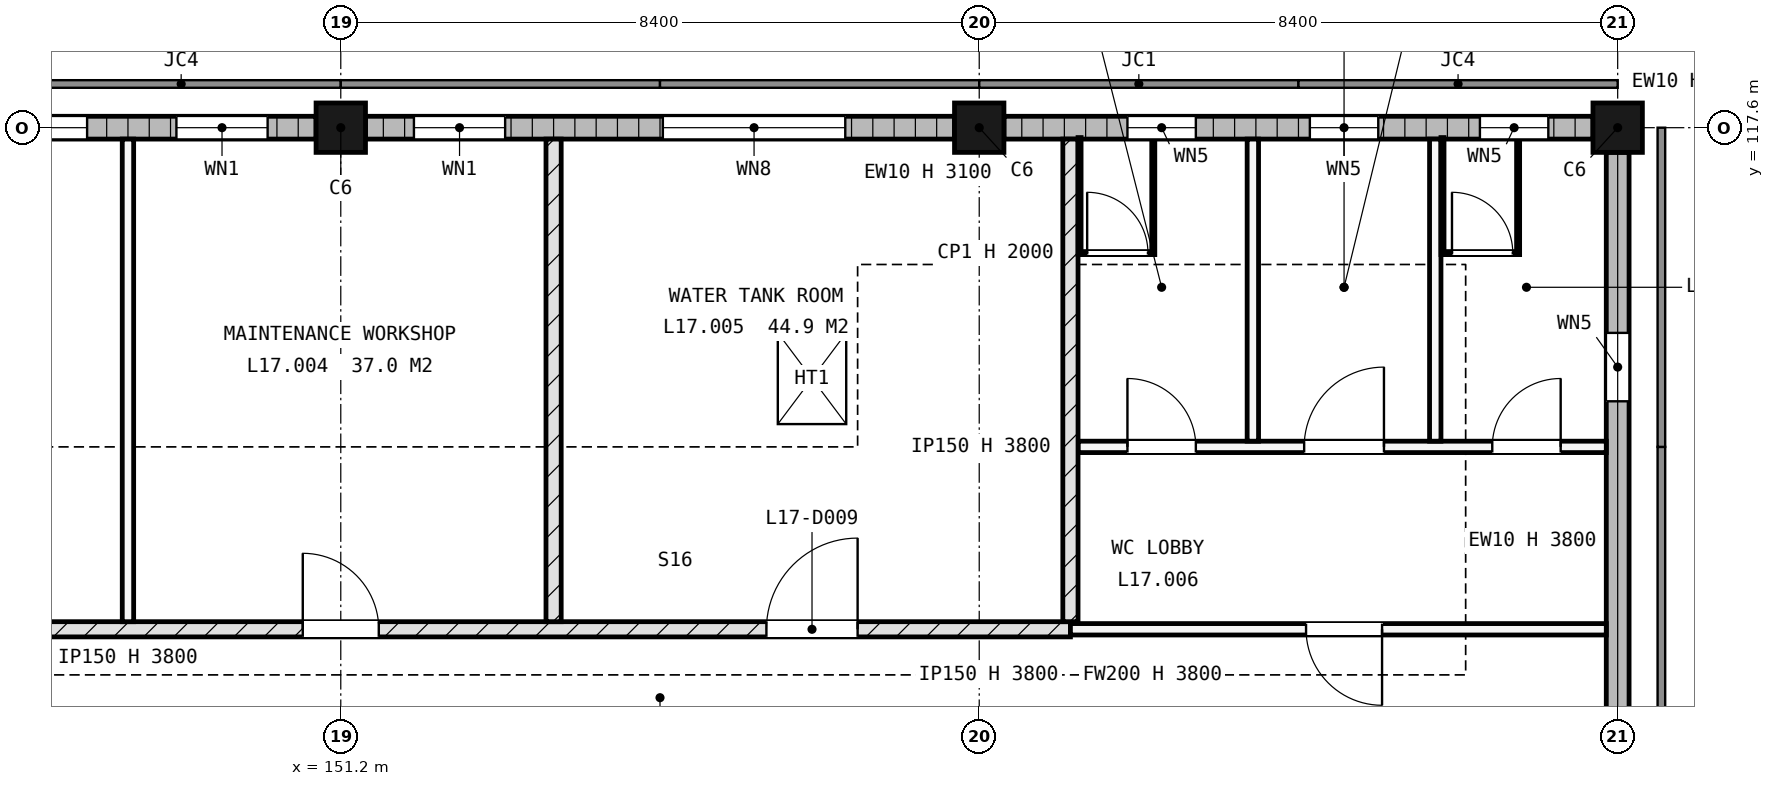
"""IFC4 building model, lengths in metres.
Left out: names, types, materials, properties, quantities, classifications, styles, units other than length and angle.
Written with IfcOpenShell. Run it as: python <this file> out.ifc"""

import sys

from ifc_helpers import new_model, si_unit, direction, frame, frame_2d, origin, origin_2d, place, context, subcontext, project, spatial, rectangle, extrude, element, fill, save


model = new_model("IFC4")
c1 = context("Model", 3, precision=1e-05, world=origin(), true_north=direction((0.0, 1.0)))
c2 = subcontext(c1, "Body", "Model", "MODEL_VIEW")
j1 = project(units=[si_unit("LENGTHUNIT", "METRE"), si_unit("PLANEANGLEUNIT", "RADIAN")], contexts=[c1])
p1 = place(None, origin())
s1 = spatial("IfcSite", under=j1, at=p1, CompositionType="ELEMENT")
p2 = place(p1, origin())
s2 = spatial("IfcBuilding", under=s1, at=p2, CompositionType="ELEMENT")
p3 = place(p2, frame((0.0, 0.0, 64.8)))
s3 = spatial("IfcBuildingStorey", under=s2, at=p3, CompositionType="ELEMENT", Elevation=64.8)
for number, where, z_axis, x_axis in (
    (1, (151.2, 117.6, -0.3), (0.0, 0.0, 1.0), (1.0, 0.0, 0.0)),
    (2, (159.6, 117.6, -0.3), (0.0, 0.0, 1.0), (1.0, 0.0, 0.0)),
    (3, (168.0, 117.6, -0.3), (0.0, 0.0, 1.0), (1.0, 0.0, 0.0)),
):
    element("IfcColumn", number, at=place(p3, frame(where, z_axis=z_axis, x_axis=x_axis)), inside=s3, PredefinedType="COLUMN", context=c2, shape_type="SweptSolid", body=[
        extrude(rectangle(XDim=0.65, YDim=0.65, at=origin_2d()), origin(), (0.0, 0.0, 1.0), 4.4),
    ])
p4 = place(p3, frame((143.125, 117.6, 0.0), z_axis=(0.0, 0.0, 1.0), x_axis=(1.0, 0.0, 0.0)))
e4 = element("IfcWall", 4, at=p4, inside=s3, PredefinedType="STANDARD", context=c2, shape_type="SweptSolid", body=[
    extrude(rectangle(XDim=7.75, YDim=0.3, at=frame_2d((3.875, 0.0))), origin(), (0.0, 0.0, 1.0), 3.1),
])
p5 = place(p4, frame((0.538, 0.0, 0.9)))
e5 = element("IfcOpeningElement", 5, at=p5, cuts=e4, PredefinedType="OPENING", context=c2, shape_type="SweptSolid", body=[
    extrude(rectangle(XDim=4.2, YDim=1.5, at=frame_2d((2.1, 0.75))), frame((0.0, 0.16, 0.0), z_axis=(0.0, -1.0, 0.0), x_axis=(1.0, 0.0, 0.0)), (0.0, 0.0, 1.0), 0.32),
])
p6 = place(p4, frame((5.913, 0.0, 0.9)))
e6 = element("IfcOpeningElement", 6, at=p6, cuts=e4, PredefinedType="OPENING", context=c2, shape_type="SweptSolid", body=[
    extrude(rectangle(XDim=1.2, YDim=1.5, at=frame_2d((0.6, 0.75))), frame((0.0, 0.16, 0.0), z_axis=(0.0, -1.0, 0.0), x_axis=(1.0, 0.0, 0.0)), (0.0, 0.0, 1.0), 0.32),
])
p7 = place(p3, frame((151.525, 117.6, 0.0), z_axis=(0.0, 0.0, 1.0), x_axis=(1.0, 0.0, 0.0)))
e7 = element("IfcWall", 7, at=p7, inside=s3, PredefinedType="STANDARD", context=c2, shape_type="SweptSolid", body=[
    extrude(rectangle(XDim=7.75, YDim=0.3, at=frame_2d((3.875, 0.0))), origin(), (0.0, 0.0, 1.0), 3.1),
])
p8 = place(p7, frame((0.637, 0.0, 0.9)))
e8 = element("IfcOpeningElement", 8, at=p8, cuts=e7, PredefinedType="OPENING", context=c2, shape_type="SweptSolid", body=[
    extrude(rectangle(XDim=1.2, YDim=1.5, at=frame_2d((0.6, 0.75))), frame((0.0, 0.16, 0.0), z_axis=(0.0, -1.0, 0.0), x_axis=(1.0, 0.0, 0.0)), (0.0, 0.0, 1.0), 0.32),
])
p9 = place(p7, frame((3.913, 0.0, 0.55)))
e9 = element("IfcOpeningElement", 9, at=p9, cuts=e7, PredefinedType="OPENING", context=c2, shape_type="SweptSolid", body=[
    extrude(rectangle(XDim=2.4, YDim=2.4, at=frame_2d((1.2, 1.2))), frame((0.0, 0.16, 0.0), z_axis=(0.0, -1.0, 0.0), x_axis=(1.0, 0.0, 0.0)), (0.0, 0.0, 1.0), 0.32),
])
p10 = place(p3, frame((159.925, 117.6, 0.0), z_axis=(0.0, 0.0, 1.0), x_axis=(1.0, 0.0, 0.0)))
e10 = element("IfcWall", 10, at=p10, inside=s3, PredefinedType="STANDARD", context=c2, shape_type="SweptSolid", body=[
    extrude(rectangle(XDim=7.75, YDim=0.3, at=frame_2d((3.875, 0.0))), origin(), (0.0, 0.0, 1.0), 3.1),
])
p11 = place(p10, frame((1.625, 0.0, 2.1)))
e11 = element("IfcOpeningElement", 11, at=p11, cuts=e10, PredefinedType="OPENING", context=c2, shape_type="SweptSolid", body=[
    extrude(rectangle(XDim=0.9, YDim=0.6, at=frame_2d((0.45, 0.3))), frame((0.0, 0.16, 0.0), z_axis=(0.0, -1.0, 0.0), x_axis=(1.0, 0.0, 0.0)), (0.0, 0.0, 1.0), 0.32),
])
p12 = place(p10, frame((4.025, 0.0, 2.1)))
e12 = element("IfcOpeningElement", 12, at=p12, cuts=e10, PredefinedType="OPENING", context=c2, shape_type="SweptSolid", body=[
    extrude(rectangle(XDim=0.9, YDim=0.6, at=frame_2d((0.45, 0.3))), frame((0.0, 0.16, 0.0), z_axis=(0.0, -1.0, 0.0), x_axis=(1.0, 0.0, 0.0)), (0.0, 0.0, 1.0), 0.32),
])
p13 = place(p10, frame((6.262, 0.0, 2.1)))
e13 = element("IfcOpeningElement", 13, at=p13, cuts=e10, PredefinedType="OPENING", context=c2, shape_type="SweptSolid", body=[
    extrude(rectangle(XDim=0.9, YDim=0.6, at=frame_2d((0.45, 0.3))), frame((0.0, 0.16, 0.0), z_axis=(0.0, -1.0, 0.0), x_axis=(1.0, 0.0, 0.0)), (0.0, 0.0, 1.0), 0.32),
])
p14 = place(p3, frame((168.0, 109.4, 0.0), z_axis=(0.0, 0.0, 1.0), x_axis=(0.0, 1.0, 0.0)))
e14 = element("IfcWall", 14, at=p14, inside=s3, PredefinedType="STANDARD", context=c2, shape_type="SweptSolid", body=[
    extrude(rectangle(XDim=7.875, YDim=0.3, at=frame_2d((3.938, 0.0))), origin(), (0.0, 0.0, 1.0), 3.8),
])
p15 = place(p14, frame((4.6, 0.0, 2.1)))
e15 = element("IfcOpeningElement", 15, at=p15, cuts=e14, PredefinedType="OPENING", context=c2, shape_type="SweptSolid", body=[
    extrude(rectangle(XDim=0.9, YDim=0.6, at=frame_2d((0.45, 0.3))), frame((0.0, 0.16, 0.0), z_axis=(0.0, -1.0, 0.0), x_axis=(1.0, 0.0, 0.0)), (0.0, 0.0, 1.0), 0.32),
])
p16 = place(p3, frame((142.95, 111.0, 0.0), z_axis=(0.0, 0.0, 1.0), x_axis=(1.0, 0.0, 0.0)))
e16 = element("IfcWall", 16, at=p16, inside=s3, PredefinedType="SOLIDWALL", context=c2, shape_type="SweptSolid", body=[
    extrude(rectangle(XDim=17.85, YDim=0.2, at=frame_2d((8.925, 0.0))), origin(), (0.0, 0.0, 1.0), 3.8),
])
p17 = place(p16, frame((2.15, 0.0, 0.0)))
e17 = element("IfcOpeningElement", 17, at=p17, cuts=e16, PredefinedType="OPENING", context=c2, shape_type="SweptSolid", body=[
    extrude(rectangle(XDim=1.0, YDim=2.1, at=frame_2d((0.5, 1.05))), frame((0.0, 0.11, 0.0), z_axis=(0.0, -1.0, 0.0), x_axis=(1.0, 0.0, 0.0)), (0.0, 0.0, 1.0), 0.22),
])
p18 = place(p16, frame((7.75, 0.0, 0.0)))
e18 = element("IfcOpeningElement", 18, at=p18, cuts=e16, PredefinedType="OPENING", context=c2, shape_type="SweptSolid", body=[
    extrude(rectangle(XDim=1.0, YDim=2.1, at=frame_2d((0.5, 1.05))), frame((0.0, 0.11, 0.0), z_axis=(0.0, -1.0, 0.0), x_axis=(1.0, 0.0, 0.0)), (0.0, 0.0, 1.0), 0.22),
])
p19 = place(p16, frame((13.85, 0.0, 0.0)))
e19 = element("IfcOpeningElement", 19, at=p19, cuts=e16, PredefinedType="OPENING", context=c2, shape_type="SweptSolid", body=[
    extrude(rectangle(XDim=1.2, YDim=2.4, at=frame_2d((0.6, 1.2))), frame((0.0, 0.11, 0.0), z_axis=(0.0, -1.0, 0.0), x_axis=(1.0, 0.0, 0.0)), (0.0, 0.0, 1.0), 0.22),
])
p20 = place(p3, frame((160.8, 111.0, 0.0), z_axis=(0.0, 0.0, 1.0), x_axis=(1.0, 0.0, 0.0)))
e20 = element("IfcWall", 20, at=p20, inside=s3, PredefinedType="PARTITIONING", context=c2, shape_type="SweptSolid", body=[
    extrude(rectangle(XDim=7.05, YDim=0.15, at=frame_2d((3.525, 0.0))), origin(), (0.0, 0.0, 1.0), 3.8),
])
p21 = place(p20, frame((3.1, 0.0, 0.0)))
e21 = element("IfcOpeningElement", 21, at=p21, cuts=e20, PredefinedType="OPENING", context=c2, shape_type="SweptSolid", body=[
    extrude(rectangle(XDim=1.0, YDim=2.1, at=frame_2d((0.5, 1.05))), frame((0.0, 0.085, 0.0), z_axis=(0.0, -1.0, 0.0), x_axis=(1.0, 0.0, 0.0)), (0.0, 0.0, 1.0), 0.17),
])
p22 = place(p3, frame((160.9, 113.4, 0.0), z_axis=(0.0, 0.0, 1.0), x_axis=(1.0, 0.0, 0.0)))
e22 = element("IfcWall", 22, at=p22, inside=s3, PredefinedType="PARTITIONING", context=c2, shape_type="SweptSolid", body=[
    extrude(rectangle(XDim=6.95, YDim=0.15, at=frame_2d((3.475, 0.0))), origin(), (0.0, 0.0, 1.0), 3.8),
])
p23 = place(p22, frame((0.65, 0.0, 0.0)))
e23 = element("IfcOpeningElement", 23, at=p23, cuts=e22, PredefinedType="OPENING", context=c2, shape_type="SweptSolid", body=[
    extrude(rectangle(XDim=0.9, YDim=2.1, at=frame_2d((0.45, 1.05))), frame((0.0, 0.085, 0.0), z_axis=(0.0, -1.0, 0.0), x_axis=(1.0, 0.0, 0.0)), (0.0, 0.0, 1.0), 0.17),
])
p24 = place(p22, frame((2.975, 0.0, 0.0)))
e24 = element("IfcOpeningElement", 24, at=p24, cuts=e22, PredefinedType="OPENING", context=c2, shape_type="SweptSolid", body=[
    extrude(rectangle(XDim=1.05, YDim=2.25, at=frame_2d((0.525, 1.125))), frame((0.0, 0.085, 0.0), z_axis=(0.0, -1.0, 0.0), x_axis=(1.0, 0.0, 0.0)), (0.0, 0.0, 1.0), 0.17),
])
p25 = place(p22, frame((5.45, 0.0, 0.0)))
e25 = element("IfcOpeningElement", 25, at=p25, cuts=e22, PredefinedType="OPENING", context=c2, shape_type="SweptSolid", body=[
    extrude(rectangle(XDim=0.9, YDim=2.1, at=frame_2d((0.45, 1.05))), frame((0.0, 0.085, 0.0), z_axis=(0.0, -1.0, 0.0), x_axis=(1.0, 0.0, 0.0)), (0.0, 0.0, 1.0), 0.17),
])
p26 = place(p3, frame((148.4, 111.1, 0.0), z_axis=(0.0, 0.0, 1.0), x_axis=(0.0, 1.0, 0.0)))
e26 = element("IfcWall", 26, at=p26, inside=s3, PredefinedType="PARTITIONING", context=c2, shape_type="SweptSolid", body=[
    extrude(rectangle(XDim=6.35, YDim=0.15, at=frame_2d((3.175, 0.0))), origin(), (0.0, 0.0, 1.0), 3.8),
])
for number, where, z_axis, x_axis in (
    (27, (154.0, 111.1, 0.0), (0.0, 0.0, 1.0), (0.0, 1.0, 0.0)),
    (28, (160.8, 111.1, 0.0), (0.0, 0.0, 1.0), (0.0, 1.0, 0.0)),
):
    element("IfcWall", number, at=place(p3, frame(where, z_axis=z_axis, x_axis=x_axis)), inside=s3, PredefinedType="SOLIDWALL", context=c2, shape_type="SweptSolid", body=[
        extrude(rectangle(XDim=6.35, YDim=0.2, at=frame_2d((3.175, 0.0))), origin(), (0.0, 0.0, 1.0), 3.8),
    ])
for number, where, z_axis, x_axis in (
    (29, (163.2, 113.475, 0.0), (0.0, 0.0, 1.0), (0.0, 1.0, 0.0)),
    (30, (165.6, 113.475, 0.0), (0.0, 0.0, 1.0), (0.0, 1.0, 0.0)),
):
    element("IfcWall", number, at=place(p3, frame(where, z_axis=z_axis, x_axis=x_axis)), inside=s3, PredefinedType="PARTITIONING", context=c2, shape_type="SweptSolid", body=[
        extrude(rectangle(XDim=3.975, YDim=0.15, at=frame_2d((1.987, 0.0))), origin(), (0.0, 0.0, 1.0), 3.8),
    ])
for number, where, z_axis, x_axis in (
    (31, (160.92, 117.47, 0.0), (0.0, 0.0, 1.0), (0.0, -1.0, 0.0)),
    (32, (161.89, 117.47, 0.0), (0.0, 0.0, 1.0), (0.0, -1.0, 0.0)),
):
    element("IfcWall", number, at=place(p3, frame(where, z_axis=z_axis, x_axis=x_axis)), inside=s3, PredefinedType="PARTITIONING", context=c2, shape_type="SweptSolid", body=[
        extrude(rectangle(XDim=1.54, YDim=0.04, at=frame_2d((0.77, 0.0))), origin(), (0.0, 0.0, 1.0), 2.0),
    ])
p27 = place(p3, frame((160.94, 115.95, 0.0), z_axis=(0.0, 0.0, 1.0), x_axis=(1.0, 0.0, 0.0)))
e33 = element("IfcWall", 33, at=p27, inside=s3, PredefinedType="PARTITIONING", context=c2, shape_type="SweptSolid", body=[
    extrude(rectangle(XDim=0.93, YDim=0.04, at=frame_2d((0.465, 0.0))), origin(), (0.0, 0.0, 1.0), 2.0),
])
p28 = place(p27, frame((0.08, 0.0, 0.0)))
e34 = element("IfcOpeningElement", 34, at=p28, cuts=e33, PredefinedType="OPENING", context=c2, shape_type="SweptSolid", body=[
    extrude(rectangle(XDim=0.8, YDim=2.0, at=frame_2d((0.4, 1.0))), frame((0.0, 0.03, 0.0), z_axis=(0.0, -1.0, 0.0), x_axis=(1.0, 0.0, 0.0)), (0.0, 0.0, 1.0), 0.06),
])
for number, where, z_axis, x_axis in (
    (35, (165.695, 117.47, 0.0), (0.0, 0.0, 1.0), (0.0, -1.0, 0.0)),
    (36, (166.69, 117.47, 0.0), (0.0, 0.0, 1.0), (0.0, -1.0, 0.0)),
):
    element("IfcWall", number, at=place(p3, frame(where, z_axis=z_axis, x_axis=x_axis)), inside=s3, PredefinedType="PARTITIONING", context=c2, shape_type="SweptSolid", body=[
        extrude(rectangle(XDim=1.54, YDim=0.04, at=frame_2d((0.77, 0.0))), origin(), (0.0, 0.0, 1.0), 2.0),
    ])
p29 = place(p3, frame((165.715, 115.95, 0.0), z_axis=(0.0, 0.0, 1.0), x_axis=(1.0, 0.0, 0.0)))
e37 = element("IfcWall", 37, at=p29, inside=s3, PredefinedType="PARTITIONING", context=c2, shape_type="SweptSolid", body=[
    extrude(rectangle(XDim=0.955, YDim=0.04, at=frame_2d((0.478, 0.0))), origin(), (0.0, 0.0, 1.0), 2.0),
])
p30 = place(p29, frame((0.105, 0.0, 0.0)))
e38 = element("IfcOpeningElement", 38, at=p30, cuts=e37, PredefinedType="OPENING", context=c2, shape_type="SweptSolid", body=[
    extrude(rectangle(XDim=0.8, YDim=2.0, at=frame_2d((0.4, 1.0))), frame((0.0, 0.03, 0.0), z_axis=(0.0, -1.0, 0.0), x_axis=(1.0, 0.0, 0.0)), (0.0, 0.0, 1.0), 0.06),
])
p31 = place(p5, origin())
e39 = element("IfcWindow", 39, at=p31, inside=s3, PartitioningType="SINGLE_PANEL", PredefinedType="WINDOW", context=c2, shape_type="SweptSolid", body=[
    extrude(rectangle(XDim=4.2, YDim=1.5, at=frame_2d((2.1, 0.75))), frame((0.0, 0.03, 0.0), z_axis=(0.0, -1.0, 0.0), x_axis=(1.0, 0.0, 0.0)), (0.0, 0.0, 1.0), 0.06),
])
fill(e5, e39)
p32 = place(p6, origin())
e40 = element("IfcWindow", 40, at=p32, inside=s3, PartitioningType="SINGLE_PANEL", PredefinedType="WINDOW", context=c2, shape_type="SweptSolid", body=[
    extrude(rectangle(XDim=1.2, YDim=1.5, at=frame_2d((0.6, 0.75))), frame((0.0, 0.03, 0.0), z_axis=(0.0, -1.0, 0.0), x_axis=(1.0, 0.0, 0.0)), (0.0, 0.0, 1.0), 0.06),
])
fill(e6, e40)
p33 = place(p8, origin())
e41 = element("IfcWindow", 41, at=p33, inside=s3, PartitioningType="SINGLE_PANEL", PredefinedType="WINDOW", context=c2, shape_type="SweptSolid", body=[
    extrude(rectangle(XDim=1.2, YDim=1.5, at=frame_2d((0.6, 0.75))), frame((0.0, 0.03, 0.0), z_axis=(0.0, -1.0, 0.0), x_axis=(1.0, 0.0, 0.0)), (0.0, 0.0, 1.0), 0.06),
])
fill(e8, e41)
p34 = place(p9, origin())
e42 = element("IfcWindow", 42, at=p34, inside=s3, PartitioningType="SINGLE_PANEL", PredefinedType="WINDOW", context=c2, shape_type="SweptSolid", body=[
    extrude(rectangle(XDim=2.4, YDim=2.4, at=frame_2d((1.2, 1.2))), frame((0.0, 0.03, 0.0), z_axis=(0.0, -1.0, 0.0), x_axis=(1.0, 0.0, 0.0)), (0.0, 0.0, 1.0), 0.06),
])
fill(e9, e42)
p35 = place(p11, origin())
e43 = element("IfcWindow", 43, at=p35, inside=s3, PartitioningType="SINGLE_PANEL", PredefinedType="WINDOW", context=c2, shape_type="SweptSolid", body=[
    extrude(rectangle(XDim=0.9, YDim=0.6, at=frame_2d((0.45, 0.3))), frame((0.0, 0.03, 0.0), z_axis=(0.0, -1.0, 0.0), x_axis=(1.0, 0.0, 0.0)), (0.0, 0.0, 1.0), 0.06),
])
fill(e11, e43)
p36 = place(p12, origin())
e44 = element("IfcWindow", 44, at=p36, inside=s3, PartitioningType="SINGLE_PANEL", PredefinedType="WINDOW", context=c2, shape_type="SweptSolid", body=[
    extrude(rectangle(XDim=0.9, YDim=0.6, at=frame_2d((0.45, 0.3))), frame((0.0, 0.03, 0.0), z_axis=(0.0, -1.0, 0.0), x_axis=(1.0, 0.0, 0.0)), (0.0, 0.0, 1.0), 0.06),
])
fill(e12, e44)
p37 = place(p13, origin())
e45 = element("IfcWindow", 45, at=p37, inside=s3, PartitioningType="SINGLE_PANEL", PredefinedType="WINDOW", context=c2, shape_type="SweptSolid", body=[
    extrude(rectangle(XDim=0.9, YDim=0.6, at=frame_2d((0.45, 0.3))), frame((0.0, 0.03, 0.0), z_axis=(0.0, -1.0, 0.0), x_axis=(1.0, 0.0, 0.0)), (0.0, 0.0, 1.0), 0.06),
])
fill(e13, e45)
p38 = place(p15, origin())
e46 = element("IfcWindow", 46, at=p38, inside=s3, PartitioningType="SINGLE_PANEL", PredefinedType="WINDOW", context=c2, shape_type="SweptSolid", body=[
    extrude(rectangle(XDim=0.9, YDim=0.6, at=frame_2d((0.45, 0.3))), frame((0.0, 0.03, 0.0), z_axis=(0.0, -1.0, 0.0), x_axis=(1.0, 0.0, 0.0)), (0.0, 0.0, 1.0), 0.06),
])
fill(e15, e46)
p39 = place(p2, frame((0.0, 0.0, 68.9)))
p40 = place(p39, frame((0.0, 0.0, -0.3)))
p41 = place(p40, frame((157.4, 114.3, 0.0)))
p42 = place(p41, frame((0.0, 0.0, 0.25)))
e47 = element("IfcWindow", 47, at=p42, inside=s3, PartitioningType="SINGLE_PANEL", PredefinedType="SKYLIGHT", context=c2, shape_type="SweptSolid", body=[
    extrude(rectangle(XDim=0.9, YDim=1.2, at=origin_2d()), origin(), (0.0, 0.0, 1.0), 0.05),
])
p43 = place(p18, origin())
e48 = element("IfcDoor", 48, at=p43, inside=s3, OperationType="SINGLE_SWING_RIGHT", PredefinedType="DOOR", context=c2, shape_type="SweptSolid", body=[
    extrude(rectangle(XDim=1.0, YDim=2.1, at=frame_2d((0.5, 1.05))), frame((0.0, 0.025, 0.0), z_axis=(0.0, -1.0, 0.0), x_axis=(1.0, 0.0, 0.0)), (0.0, 0.0, 1.0), 0.05),
])
fill(e18, e48)
p44 = place(p19, origin())
e49 = element("IfcDoor", 49, at=p44, inside=s3, OperationType="SINGLE_SWING_LEFT", PredefinedType="DOOR", context=c2, shape_type="SweptSolid", body=[
    extrude(rectangle(XDim=1.2, YDim=2.4, at=frame_2d((0.6, 1.2))), frame((0.0, 0.025, 0.0), z_axis=(0.0, -1.0, 0.0), x_axis=(1.0, 0.0, 0.0)), (0.0, 0.0, 1.0), 0.05),
])
fill(e19, e49)
p45 = place(p23, origin())
e50 = element("IfcDoor", 50, at=p45, inside=s3, OperationType="SINGLE_SWING_RIGHT", PredefinedType="DOOR", context=c2, shape_type="SweptSolid", body=[
    extrude(rectangle(XDim=0.9, YDim=2.1, at=frame_2d((0.45, 1.05))), frame((0.0, 0.025, 0.0), z_axis=(0.0, -1.0, 0.0), x_axis=(1.0, 0.0, 0.0)), (0.0, 0.0, 1.0), 0.05),
])
fill(e23, e50)
p46 = place(p24, origin())
e51 = element("IfcDoor", 51, at=p46, inside=s3, OperationType="SINGLE_SWING_LEFT", PredefinedType="DOOR", context=c2, shape_type="SweptSolid", body=[
    extrude(rectangle(XDim=1.05, YDim=2.25, at=frame_2d((0.525, 1.125))), frame((0.0, 0.025, 0.0), z_axis=(0.0, -1.0, 0.0), x_axis=(1.0, 0.0, 0.0)), (0.0, 0.0, 1.0), 0.05),
])
fill(e24, e51)
p47 = place(p25, origin())
e52 = element("IfcDoor", 52, at=p47, inside=s3, OperationType="SINGLE_SWING_LEFT", PredefinedType="DOOR", context=c2, shape_type="SweptSolid", body=[
    extrude(rectangle(XDim=0.9, YDim=2.1, at=frame_2d((0.45, 1.05))), frame((0.0, 0.025, 0.0), z_axis=(0.0, -1.0, 0.0), x_axis=(1.0, 0.0, 0.0)), (0.0, 0.0, 1.0), 0.05),
])
fill(e25, e52)
p48 = place(p21, origin())
e53 = element("IfcDoor", 53, at=p48, inside=s3, OperationType="SINGLE_SWING_RIGHT", PredefinedType="DOOR", context=c2, shape_type="SweptSolid", body=[
    extrude(rectangle(XDim=1.0, YDim=2.1, at=frame_2d((0.5, 1.05))), frame((0.0, 0.025, 0.0), z_axis=(0.0, -1.0, 0.0), x_axis=(1.0, 0.0, 0.0)), (0.0, 0.0, 1.0), 0.05),
])
fill(e21, e53)
p49 = place(p28, origin())
e54 = element("IfcDoor", 54, at=p49, inside=s3, OperationType="SINGLE_SWING_LEFT", PredefinedType="DOOR", context=c2, shape_type="SweptSolid", body=[
    extrude(rectangle(XDim=0.8, YDim=2.0, at=frame_2d((0.4, 1.0))), frame((0.0, 0.02, 0.0), z_axis=(0.0, -1.0, 0.0), x_axis=(1.0, 0.0, 0.0)), (0.0, 0.0, 1.0), 0.04),
])
fill(e34, e54)
p50 = place(p30, origin())
e55 = element("IfcDoor", 55, at=p50, inside=s3, OperationType="SINGLE_SWING_LEFT", PredefinedType="DOOR", context=c2, shape_type="SweptSolid", body=[
    extrude(rectangle(XDim=0.8, YDim=2.0, at=frame_2d((0.4, 1.0))), frame((0.0, 0.02, 0.0), z_axis=(0.0, -1.0, 0.0), x_axis=(1.0, 0.0, 0.0)), (0.0, 0.0, 1.0), 0.04),
])
fill(e38, e55)
save(model, sys.argv[1])
